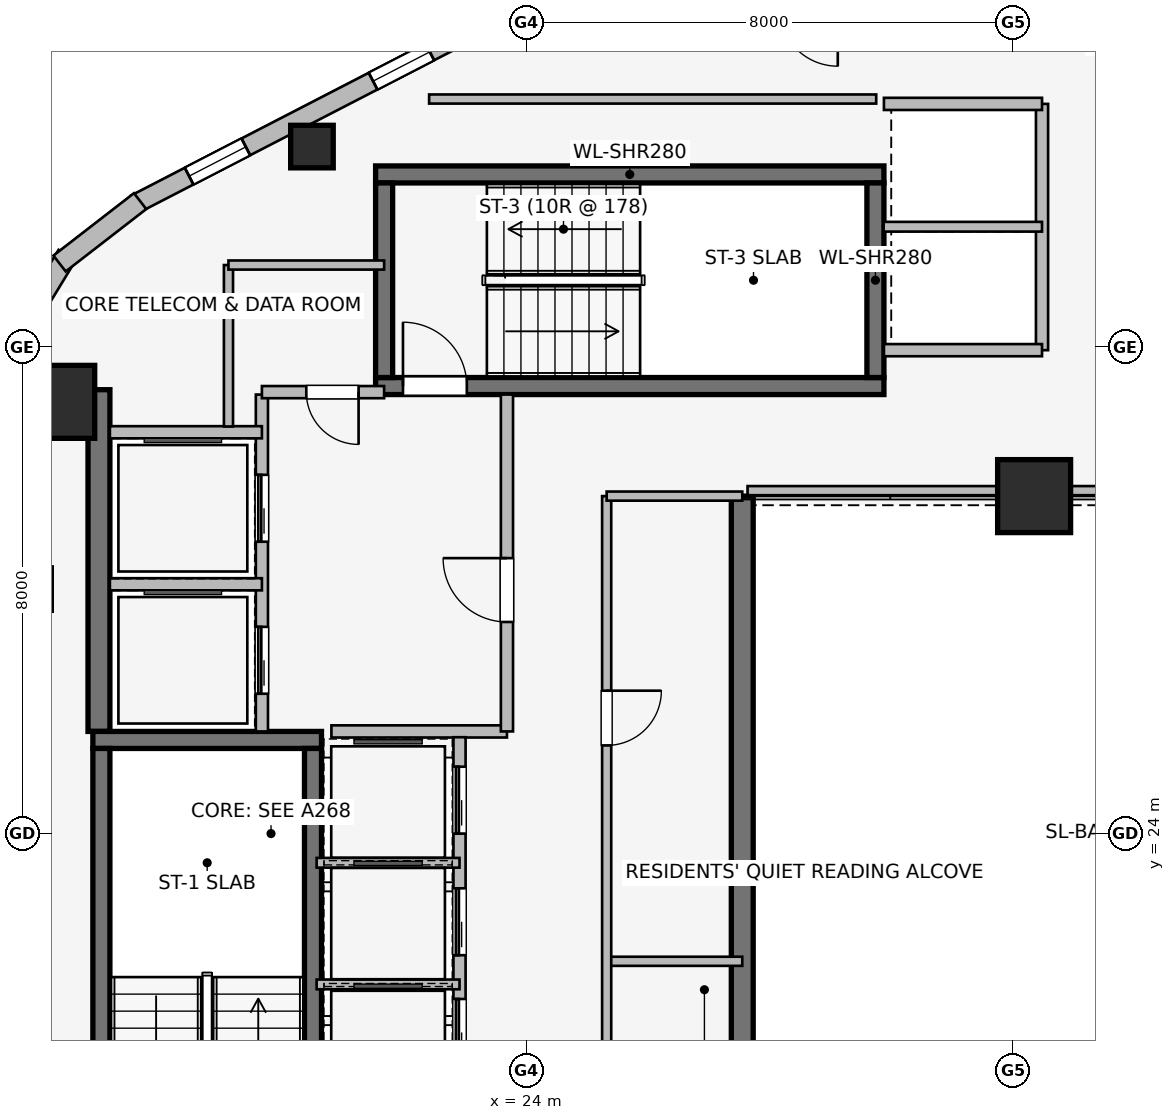
"""IFC4 building model, lengths in metres.
Left out: names, types, materials, properties, quantities, classifications, styles, units other than length and angle.
Written with IfcOpenShell. Run it as: python <this file> out.ifc"""

import sys

from ifc_helpers import new_model, si_unit, direction, frame, frame_2d, origin, origin_2d, place, context, subcontext, project, spatial, rectangle, extrude, element, fill, save


model = new_model("IFC4")
c1 = context("Model", 3, precision=1e-05, world=origin(), true_north=direction((0.0, 1.0)))
c2 = subcontext(c1, "Body", "Model", "MODEL_VIEW")
j1 = project(units=[si_unit("LENGTHUNIT", "METRE"), si_unit("PLANEANGLEUNIT", "RADIAN")], contexts=[c1])
p1 = place(None, origin())
s1 = spatial("IfcSite", under=j1, at=p1, CompositionType="ELEMENT")
p2 = place(p1, origin())
s2 = spatial("IfcBuilding", under=s1, at=p2, CompositionType="ELEMENT")
p3 = place(p2, frame((0.0, 0.0, 241.9)))
s3 = spatial("IfcBuildingStorey", under=s2, at=p3, CompositionType="ELEMENT", Elevation=241.9)
p4 = place(p3, frame((16.97, 25.68, 0.0), z_axis=(0.0, 0.0, 1.0), x_axis=(0.0, 1.0, 0.0)))
e1 = element("IfcWall", 1, at=p4, inside=s3, PredefinedType="SHEAR", context=c2, shape_type="SweptSolid", body=[
    extrude(rectangle(XDim=5.62, YDim=0.36, at=frame_2d((2.81, 0.0))), origin(), (0.0, 0.0, 1.0), 3.55),
])
p5 = place(p3, frame((27.55, 29.55, 0.0), z_axis=(0.0, 0.0, 1.0), x_axis=(0.0, -1.0, 0.0)))
e2 = element("IfcWall", 2, at=p5, inside=s3, PredefinedType="SHEAR", context=c2, shape_type="SweptSolid", body=[
    extrude(rectangle(XDim=11.25, YDim=0.36, at=frame_2d((5.625, 0.0))), origin(), (0.0, 0.0, 1.0), 3.55),
])
p6 = place(p3, frame((20.63, 25.54, 0.0), z_axis=(0.0, 0.0, 1.0), x_axis=(-1.0, 0.0, 0.0)))
e3 = element("IfcWall", 3, at=p6, inside=s3, PredefinedType="SHEAR", context=c2, shape_type="SweptSolid", body=[
    extrude(rectangle(XDim=3.76, YDim=0.28, at=frame_2d((1.88, 0.0))), origin(), (0.0, 0.0, 1.0), 3.55),
])
p7 = place(p3, frame((17.01, 25.4, 0.0), z_axis=(0.0, 0.0, 1.0), x_axis=(0.0, -1.0, 0.0)))
e4 = element("IfcWall", 4, at=p7, inside=s3, PredefinedType="SHEAR", context=c2, shape_type="SweptSolid", body=[
    extrude(rectangle(XDim=7.8, YDim=0.28, at=frame_2d((3.9, 0.0))), origin(), (0.0, 0.0, 1.0), 3.55),
])
p8 = place(p3, frame((20.49, 17.6, 0.0), z_axis=(0.0, 0.0, 1.0), x_axis=(0.0, 1.0, 0.0)))
e5 = element("IfcWall", 5, at=p8, inside=s3, PredefinedType="SHEAR", context=c2, shape_type="SweptSolid", body=[
    extrude(rectangle(XDim=7.8, YDim=0.28, at=frame_2d((3.9, 0.0))), origin(), (0.0, 0.0, 1.0), 3.55),
])
p9 = place(p8, frame((0.44, 0.0, 0.0)))
e6 = element("IfcOpeningElement", 6, at=p9, cuts=e5, PredefinedType="OPENING", context=c2, shape_type="SweptSolid", body=[
    extrude(rectangle(XDim=1.05, YDim=2.0, at=frame_2d((0.525, 1.0))), frame((0.0, 0.15, 0.0), z_axis=(0.0, -1.0, 0.0), x_axis=(1.0, 0.0, 0.0)), (0.0, 0.0, 1.0), 0.3),
])
p10 = place(p3, frame((21.52, 31.36, 0.0), z_axis=(0.0, 0.0, 1.0), x_axis=(1.0, 0.0, 0.0)))
e7 = element("IfcWall", 7, at=p10, inside=s3, PredefinedType="SHEAR", context=c2, shape_type="SweptSolid", body=[
    extrude(rectangle(XDim=8.36, YDim=0.28, at=frame_2d((4.18, 0.0))), origin(), (0.0, 0.0, 1.0), 3.55),
])
p11 = place(p10, frame((0.45, 0.0, 0.0)))
e8 = element("IfcOpeningElement", 8, at=p11, cuts=e7, PredefinedType="OPENING", context=c2, shape_type="SweptSolid", body=[
    extrude(rectangle(XDim=1.05, YDim=2.0, at=frame_2d((0.525, 1.0))), frame((0.0, 0.15, 0.0), z_axis=(0.0, -1.0, 0.0), x_axis=(1.0, 0.0, 0.0)), (0.0, 0.0, 1.0), 0.3),
])
p12 = place(p3, frame((29.88, 34.84, 0.0), z_axis=(0.0, 0.0, 1.0), x_axis=(-1.0, 0.0, 0.0)))
e9 = element("IfcWall", 9, at=p12, inside=s3, PredefinedType="SHEAR", context=c2, shape_type="SweptSolid", body=[
    extrude(rectangle(XDim=8.36, YDim=0.28, at=frame_2d((4.18, 0.0))), origin(), (0.0, 0.0, 1.0), 3.55),
])
for number, where, z_axis, x_axis in (
    (10, (21.66, 34.7, 0.0), (0.0, 0.0, 1.0), (0.0, -1.0, 0.0)),
    (11, (29.74, 31.5, 0.0), (0.0, 0.0, 1.0), (0.0, 1.0, 0.0)),
):
    element("IfcWall", number, at=place(p3, frame(where, z_axis=z_axis, x_axis=x_axis)), inside=s3, PredefinedType="SHEAR", context=c2, shape_type="SweptSolid", body=[
        extrude(rectangle(XDim=3.2, YDim=0.28, at=frame_2d((1.6, 0.0))), origin(), (0.0, 0.0, 1.0), 3.55),
    ])
for number, where, z_axis, x_axis in (
    (12, (16.3, 31.1, 0.0), (0.0, 0.0, 1.0), (1.0, 0.0, 0.0)),
    (13, (32.35, 29.55, 0.0), (0.0, 0.0, 1.0), (1.0, 0.0, 0.0)),
):
    element("IfcColumn", number, at=place(p3, frame(where, z_axis=z_axis, x_axis=x_axis)), inside=s3, PredefinedType="COLUMN", context=c2, shape_type="SweptSolid", body=[
        extrude(rectangle(XDim=1.2, YDim=1.2, at=origin_2d()), origin(), (0.0, 0.0, 1.0), 3.55),
    ])
p13 = place(p3, frame((20.473, 35.298, 0.0), z_axis=(0.0, 0.0, 1.0), x_axis=(1.0, 0.0, 0.0)))
e14 = element("IfcColumn", 14, at=p13, inside=s3, PredefinedType="COLUMN", context=c2, shape_type="SweptSolid", body=[
    extrude(rectangle(XDim=0.7, YDim=0.7, at=origin_2d()), origin(), (0.0, 0.0, 1.0), 3.55),
])
p14 = place(p3, frame((17.566, 34.354, 0.0), z_axis=(0.0, 0.0, 1.0), x_axis=(0.888581481622, 0.458718814218, 0.0)))
e15 = element("IfcWall", 15, at=p14, inside=s3, PredefinedType="STANDARD", context=c2, shape_type="SweptSolid", body=[
    extrude(rectangle(XDim=15.077, YDim=0.31, at=frame_2d((7.539, 0.0))), origin(), (0.0, 0.0, 1.0), 3.29),
])
p15 = place(p14, frame((0.998, 0.0, 0.75)))
e16 = element("IfcOpeningElement", 16, at=p15, cuts=e15, PredefinedType="OPENING", context=c2, shape_type="SweptSolid", body=[
    extrude(rectangle(XDim=1.05, YDim=1.4, at=frame_2d((0.525, 0.7))), frame((0.0, 0.165, 0.0), z_axis=(0.0, -1.0, 0.0), x_axis=(1.0, 0.0, 0.0)), (0.0, 0.0, 1.0), 0.33),
])
p16 = place(p14, frame((4.403, 0.0, 0.75)))
e17 = element("IfcOpeningElement", 17, at=p16, cuts=e15, PredefinedType="OPENING", context=c2, shape_type="SweptSolid", body=[
    extrude(rectangle(XDim=1.05, YDim=1.4, at=frame_2d((0.525, 0.7))), frame((0.0, 0.165, 0.0), z_axis=(0.0, -1.0, 0.0), x_axis=(1.0, 0.0, 0.0)), (0.0, 0.0, 1.0), 0.33),
])
p17 = place(p14, frame((8.086, 0.0, 0.75)))
e18 = element("IfcOpeningElement", 18, at=p17, cuts=e15, PredefinedType="OPENING", context=c2, shape_type="SweptSolid", body=[
    extrude(rectangle(XDim=2.4, YDim=1.6, at=frame_2d((1.2, 0.8))), frame((0.0, 0.165, 0.0), z_axis=(0.0, -1.0, 0.0), x_axis=(1.0, 0.0, 0.0)), (0.0, 0.0, 1.0), 0.33),
])
p18 = place(p14, frame((13.029, 0.0, 0.75)))
e19 = element("IfcOpeningElement", 19, at=p18, cuts=e15, PredefinedType="OPENING", context=c2, shape_type="SweptSolid", body=[
    extrude(rectangle(XDim=1.05, YDim=1.4, at=frame_2d((0.525, 0.7))), frame((0.0, 0.165, 0.0), z_axis=(0.0, -1.0, 0.0), x_axis=(1.0, 0.0, 0.0)), (0.0, 0.0, 1.0), 0.33),
])
p19 = place(p3, frame((15.574, 32.082, 0.0), z_axis=(0.0, 0.0, 1.0), x_axis=(0.520325409202, 0.853968072318, 0.0)))
e20 = element("IfcWall", 20, at=p19, inside=s3, PredefinedType="STANDARD", context=c2, shape_type="SweptSolid", body=[
    extrude(rectangle(XDim=1.678, YDim=0.33, at=frame_2d((0.839, 0.0))), origin(), (0.0, 0.0, 1.0), 3.29),
])
p20 = place(p3, frame((16.322, 33.375, 0.0), z_axis=(0.0, 0.0, 1.0), x_axis=(0.790691856293, 0.61221433207, 0.0)))
e21 = element("IfcWall", 21, at=p20, inside=s3, PredefinedType="STANDARD", context=c2, shape_type="SweptSolid", body=[
    extrude(rectangle(XDim=1.676, YDim=0.33, at=frame_2d((0.838, 0.0))), origin(), (0.0, 0.0, 1.0), 3.29),
])
p21 = place(p3, frame((19.65, 25.68, 0.0), z_axis=(0.0, 0.0, 1.0), x_axis=(0.0, 1.0, 0.0)))
e22 = element("IfcWall", 22, at=p21, inside=s3, PredefinedType="PARTITIONING", context=c2, shape_type="SweptSolid", body=[
    extrude(rectangle(XDim=5.54, YDim=0.2, at=frame_2d((2.77, 0.0))), origin(), (0.0, 0.0, 1.0), 3.29),
])
p22 = place(p21, frame((0.62, 0.0, 0.0)))
e23 = element("IfcOpeningElement", 23, at=p22, cuts=e22, PredefinedType="OPENING", context=c2, shape_type="SweptSolid", body=[
    extrude(rectangle(XDim=1.1, YDim=2.2, at=frame_2d((0.55, 1.1))), frame((0.0, 0.11, 0.0), z_axis=(0.0, -1.0, 0.0), x_axis=(1.0, 0.0, 0.0)), (0.0, 0.0, 1.0), 0.22),
])
p23 = place(p21, frame((3.12, 0.0, 0.0)))
e24 = element("IfcOpeningElement", 24, at=p23, cuts=e22, PredefinedType="OPENING", context=c2, shape_type="SweptSolid", body=[
    extrude(rectangle(XDim=1.1, YDim=2.2, at=frame_2d((0.55, 1.1))), frame((0.0, 0.11, 0.0), z_axis=(0.0, -1.0, 0.0), x_axis=(1.0, 0.0, 0.0)), (0.0, 0.0, 1.0), 0.22),
])
p24 = place(p3, frame((20.793, 25.68, 0.0), z_axis=(0.0, 0.0, 1.0), x_axis=(1.0, 0.0, 0.0)))
e25 = element("IfcWall", 25, at=p24, inside=s3, PredefinedType="PARTITIONING", context=c2, shape_type="SweptSolid", body=[
    extrude(rectangle(XDim=2.887, YDim=0.2, at=frame_2d((1.443, 0.0))), origin(), (0.0, 0.0, 1.0), 3.29),
])
p25 = place(p3, frame((23.68, 25.68, 0.0), z_axis=(0.0, 0.0, 1.0), x_axis=(0.0, 1.0, 0.0)))
e26 = element("IfcWall", 26, at=p25, inside=s3, PredefinedType="PARTITIONING", context=c2, shape_type="SweptSolid", body=[
    extrude(rectangle(XDim=5.54, YDim=0.2, at=frame_2d((2.77, 0.0))), origin(), (0.0, 0.0, 1.0), 3.29),
])
p26 = place(p25, frame((1.8, 0.0, 0.0)))
e27 = element("IfcOpeningElement", 27, at=p26, cuts=e26, PredefinedType="OPENING", context=c2, shape_type="SweptSolid", body=[
    extrude(rectangle(XDim=1.05, YDim=2.0, at=frame_2d((0.525, 1.0))), frame((0.0, 0.11, 0.0), z_axis=(0.0, -1.0, 0.0), x_axis=(1.0, 0.0, 0.0)), (0.0, 0.0, 1.0), 0.22),
])
p27 = place(p3, frame((21.66, 31.26, 0.0), z_axis=(0.0, 0.0, 1.0), x_axis=(-1.0, 0.0, 0.0)))
e28 = element("IfcWall", 28, at=p27, inside=s3, PredefinedType="PARTITIONING", context=c2, shape_type="SweptSolid", body=[
    extrude(rectangle(XDim=2.01, YDim=0.2, at=frame_2d((1.005, 0.0))), origin(), (0.0, 0.0, 1.0), 3.29),
])
p28 = place(p27, frame((0.42, 0.0, 0.0)))
e29 = element("IfcOpeningElement", 29, at=p28, cuts=e28, PredefinedType="OPENING", context=c2, shape_type="SweptSolid", body=[
    extrude(rectangle(XDim=0.86, YDim=2.0, at=frame_2d((0.43, 1.0))), frame((0.0, 0.11, 0.0), z_axis=(0.0, -1.0, 0.0), x_axis=(1.0, 0.0, 0.0)), (0.0, 0.0, 1.0), 0.22),
])
p29 = place(p3, frame((17.15, 28.1, 0.0), z_axis=(0.0, 0.0, 1.0), x_axis=(1.0, 0.0, 0.0)))
e30 = element("IfcWall", 30, at=p29, inside=s3, PredefinedType="PARTITIONING", context=c2, shape_type="SweptSolid", body=[
    extrude(rectangle(XDim=2.5, YDim=0.2, at=frame_2d((1.25, 0.0))), origin(), (0.0, 0.0, 1.0), 3.29),
])
p30 = place(p3, frame((19.65, 30.6, 0.0), z_axis=(0.0, 0.0, 1.0), x_axis=(-1.0, 0.0, 0.0)))
e31 = element("IfcWall", 31, at=p30, inside=s3, PredefinedType="PARTITIONING", context=c2, shape_type="SweptSolid", body=[
    extrude(rectangle(XDim=2.5, YDim=0.2, at=frame_2d((1.25, 0.0))), origin(), (0.0, 0.0, 1.0), 2.19),
])
p31 = place(p3, frame((32.48, 31.95, 0.0), z_axis=(0.0, 0.0, 1.0), x_axis=(0.0, 1.0, 0.0)))
e32 = element("IfcWall", 32, at=p31, inside=s3, PredefinedType="PARTITIONING", context=c2, shape_type="SweptSolid", body=[
    extrude(rectangle(XDim=4.05, YDim=0.2, at=frame_2d((2.025, 0.0))), origin(), (0.0, 0.0, 1.0), 3.29),
])
p32 = place(p3, frame((29.88, 36.0, 0.0), z_axis=(0.0, 0.0, 1.0), x_axis=(1.0, 0.0, 0.0)))
e33 = element("IfcWall", 33, at=p32, inside=s3, PredefinedType="PARTITIONING", context=c2, shape_type="SweptSolid", body=[
    extrude(rectangle(XDim=2.6, YDim=0.2, at=frame_2d((1.3, 0.0))), origin(), (0.0, 0.0, 1.0), 3.29),
])
p33 = place(p3, frame((32.48, 31.95, 0.0), z_axis=(0.0, 0.0, 1.0), x_axis=(-1.0, 0.0, 0.0)))
e34 = element("IfcWall", 34, at=p33, inside=s3, PredefinedType="PARTITIONING", context=c2, shape_type="SweptSolid", body=[
    extrude(rectangle(XDim=2.6, YDim=0.2, at=frame_2d((1.3, 0.0))), origin(), (0.0, 0.0, 1.0), 2.682),
])
p34 = place(p3, frame((29.875, 33.98, 0.0), z_axis=(0.0, 0.0, 1.0), x_axis=(1.0, 0.0, 0.0)))
e35 = element("IfcWall", 35, at=p34, inside=s3, PredefinedType="PARTITIONING", context=c2, shape_type="SweptSolid", body=[
    extrude(rectangle(XDim=2.605, YDim=0.16, at=frame_2d((1.302, 0.0))), origin(), (0.0, 0.0, 1.0), 3.29),
])
p35 = place(p3, frame((22.9, 19.5, 0.0), z_axis=(0.0, 0.0, 1.0), x_axis=(0.0, 1.0, 0.0)))
e36 = element("IfcWall", 36, at=p35, inside=s3, PredefinedType="PARTITIONING", context=c2, shape_type="SweptSolid", body=[
    extrude(rectangle(XDim=6.085, YDim=0.2, at=frame_2d((3.042, 0.0))), origin(), (0.0, 0.0, 1.0), 3.29),
])
p36 = place(p35, frame((0.68, 0.0, 0.0)))
e37 = element("IfcOpeningElement", 37, at=p36, cuts=e36, PredefinedType="OPENING", context=c2, shape_type="SweptSolid", body=[
    extrude(rectangle(XDim=1.1, YDim=2.2, at=frame_2d((0.55, 1.1))), frame((0.0, 0.11, 0.0), z_axis=(0.0, -1.0, 0.0), x_axis=(1.0, 0.0, 0.0)), (0.0, 0.0, 1.0), 0.22),
])
p37 = place(p35, frame((2.5, 0.0, 0.0)))
e38 = element("IfcOpeningElement", 38, at=p37, cuts=e36, PredefinedType="OPENING", context=c2, shape_type="SweptSolid", body=[
    extrude(rectangle(XDim=1.1, YDim=2.2, at=frame_2d((0.55, 1.1))), frame((0.0, 0.11, 0.0), z_axis=(0.0, -1.0, 0.0), x_axis=(1.0, 0.0, 0.0)), (0.0, 0.0, 1.0), 0.22),
])
p38 = place(p35, frame((4.5, 0.0, 0.0)))
e39 = element("IfcOpeningElement", 39, at=p38, cuts=e36, PredefinedType="OPENING", context=c2, shape_type="SweptSolid", body=[
    extrude(rectangle(XDim=1.1, YDim=2.2, at=frame_2d((0.55, 1.1))), frame((0.0, 0.11, 0.0), z_axis=(0.0, -1.0, 0.0), x_axis=(1.0, 0.0, 0.0)), (0.0, 0.0, 1.0), 0.22),
])
for number, where, z_axis, x_axis in (
    (40, (20.55, 21.52, 0.0), (0.0, 0.0, 1.0), (1.0, 0.0, 0.0)),
    (41, (20.55, 23.52, 0.0), (0.0, 0.0, 1.0), (1.0, 0.0, 0.0)),
):
    element("IfcWall", number, at=place(p3, frame(where, z_axis=z_axis, x_axis=x_axis)), inside=s3, PredefinedType="PARTITIONING", context=c2, shape_type="SweptSolid", body=[
        extrude(rectangle(XDim=2.35, YDim=0.16, at=frame_2d((1.175, 0.0))), origin(), (0.0, 0.0, 1.0), 3.29),
    ])
p39 = place(p3, frame((25.32, 21.9, 0.0), z_axis=(0.0, 0.0, 1.0), x_axis=(1.0, 0.0, 0.0)))
e42 = element("IfcWall", 42, at=p39, inside=s3, PredefinedType="PARTITIONING", context=c2, shape_type="SweptSolid", body=[
    extrude(rectangle(XDim=2.23, YDim=0.15, at=frame_2d((1.115, 0.0))), origin(), (0.0, 0.0, 1.0), 3.29),
])
p40 = place(p3, frame((25.32, 29.55, 0.0), z_axis=(0.0, 0.0, 1.0), x_axis=(0.0, -1.0, 0.0)))
e43 = element("IfcWall", 43, at=p40, inside=s3, PredefinedType="PARTITIONING", context=c2, shape_type="SweptSolid", body=[
    extrude(rectangle(XDim=11.19, YDim=0.15, at=frame_2d((5.595, 0.0))), origin(), (0.0, 0.0, 1.0), 3.29),
])
p41 = place(p40, frame((3.2, 0.0, 0.0)))
e44 = element("IfcOpeningElement", 44, at=p41, cuts=e43, PredefinedType="OPENING", context=c2, shape_type="SweptSolid", body=[
    extrude(rectangle(XDim=0.9, YDim=2.0, at=frame_2d((0.45, 1.0))), frame((0.0, 0.085, 0.0), z_axis=(0.0, -1.0, 0.0), x_axis=(1.0, 0.0, 0.0)), (0.0, 0.0, 1.0), 0.17),
])
p42 = place(p40, frame((9.1, 0.0, 0.0)))
e45 = element("IfcOpeningElement", 45, at=p42, cuts=e43, PredefinedType="OPENING", context=c2, shape_type="SweptSolid", body=[
    extrude(rectangle(XDim=0.86, YDim=2.0, at=frame_2d((0.43, 1.0))), frame((0.0, 0.085, 0.0), z_axis=(0.0, -1.0, 0.0), x_axis=(1.0, 0.0, 0.0)), (0.0, 0.0, 1.0), 0.17),
])
p43 = place(p3, frame((27.55, 29.55, 0.0), z_axis=(0.0, 0.0, 1.0), x_axis=(-1.0, 0.0, 0.0)))
e46 = element("IfcWall", 46, at=p43, inside=s3, PredefinedType="PARTITIONING", context=c2, shape_type="SweptSolid", body=[
    extrude(rectangle(XDim=2.23, YDim=0.15, at=frame_2d((1.115, 0.0))), origin(), (0.0, 0.0, 1.0), 2.19),
])
p44 = place(p3, frame((19.1, 33.35, 0.0), z_axis=(0.0, 0.0, 1.0), x_axis=(0.0, -1.0, 0.0)))
e47 = element("IfcWall", 47, at=p44, inside=s3, PredefinedType="PARTITIONING", context=c2, shape_type="SweptSolid", body=[
    extrude(rectangle(XDim=2.655, YDim=0.15, at=frame_2d((1.328, 0.0))), origin(), (0.0, 0.0, 1.0), 3.29),
])
p45 = place(p3, frame((21.66, 33.35, 0.0), z_axis=(0.0, 0.0, 1.0), x_axis=(-1.0, 0.0, 0.0)))
e48 = element("IfcWall", 48, at=p45, inside=s3, PredefinedType="PARTITIONING", context=c2, shape_type="SweptSolid", body=[
    extrude(rectangle(XDim=2.56, YDim=0.15, at=frame_2d((1.28, 0.0))), origin(), (0.0, 0.0, 1.0), 3.29),
])
p46 = place(p3, frame((39.84, 29.64, 0.0), z_axis=(0.0, 0.0, 1.0), x_axis=(-1.0, 0.0, 0.0)))
e49 = element("IfcWall", 49, at=p46, inside=s3, PredefinedType="PARTITIONING", context=c2, shape_type="SweptSolid", body=[
    extrude(rectangle(XDim=12.203, YDim=0.15, at=frame_2d((6.102, 0.0))), origin(), (0.0, 0.0, 1.0), 2.431),
])
p47 = place(p3, frame((29.753, 36.08, 0.0), z_axis=(0.0, 0.0, 1.0), x_axis=(-1.0, 0.0, 0.0)))
e50 = element("IfcWall", 50, at=p47, inside=s3, PredefinedType="PARTITIONING", context=c2, shape_type="SweptSolid", body=[
    extrude(rectangle(XDim=7.353, YDim=0.15, at=frame_2d((3.677, 0.0))), origin(), (0.0, 0.0, 1.0), 3.29),
])
p48 = place(p15, origin())
e51 = element("IfcWindow", 51, at=p48, inside=s3, PartitioningType="SINGLE_PANEL", PredefinedType="WINDOW", context=c2, shape_type="SweptSolid", body=[
    extrude(rectangle(XDim=1.05, YDim=1.4, at=frame_2d((0.525, 0.7))), frame((0.0, 0.03, 0.0), z_axis=(0.0, -1.0, 0.0), x_axis=(1.0, 0.0, 0.0)), (0.0, 0.0, 1.0), 0.06),
])
fill(e16, e51)
p49 = place(p16, origin())
e52 = element("IfcWindow", 52, at=p49, inside=s3, PartitioningType="SINGLE_PANEL", PredefinedType="WINDOW", context=c2, shape_type="SweptSolid", body=[
    extrude(rectangle(XDim=1.05, YDim=1.4, at=frame_2d((0.525, 0.7))), frame((0.0, 0.03, 0.0), z_axis=(0.0, -1.0, 0.0), x_axis=(1.0, 0.0, 0.0)), (0.0, 0.0, 1.0), 0.06),
])
fill(e17, e52)
p50 = place(p11, origin())
e53 = element("IfcDoor", 53, at=p50, inside=s3, OperationType="SINGLE_SWING_LEFT", PredefinedType="DOOR", context=c2, shape_type="SweptSolid", body=[
    extrude(rectangle(XDim=1.05, YDim=2.0, at=frame_2d((0.525, 1.0))), frame((0.0, 0.025, 0.0), z_axis=(0.0, -1.0, 0.0), x_axis=(1.0, 0.0, 0.0)), (0.0, 0.0, 1.0), 0.05),
])
fill(e8, e53)
p51 = place(p22, origin())
e54 = element("IfcDoor", 54, at=p51, inside=s3, OperationType="SLIDING_TO_LEFT", PredefinedType="DOOR", context=c2, shape_type="SweptSolid", body=[
    extrude(rectangle(XDim=1.1, YDim=2.2, at=frame_2d((0.55, 1.1))), frame((0.0, 0.025, 0.0), z_axis=(0.0, -1.0, 0.0), x_axis=(1.0, 0.0, 0.0)), (0.0, 0.0, 1.0), 0.05),
])
fill(e23, e54)
p52 = place(p23, origin())
e55 = element("IfcDoor", 55, at=p52, inside=s3, OperationType="SLIDING_TO_LEFT", PredefinedType="DOOR", context=c2, shape_type="SweptSolid", body=[
    extrude(rectangle(XDim=1.1, YDim=2.2, at=frame_2d((0.55, 1.1))), frame((0.0, 0.025, 0.0), z_axis=(0.0, -1.0, 0.0), x_axis=(1.0, 0.0, 0.0)), (0.0, 0.0, 1.0), 0.05),
])
fill(e24, e55)
p53 = place(p26, origin())
e56 = element("IfcDoor", 56, at=p53, inside=s3, OperationType="SINGLE_SWING_RIGHT", PredefinedType="DOOR", context=c2, shape_type="SweptSolid", body=[
    extrude(rectangle(XDim=1.05, YDim=2.0, at=frame_2d((0.525, 1.0))), frame((0.0, 0.025, 0.0), z_axis=(0.0, -1.0, 0.0), x_axis=(1.0, 0.0, 0.0)), (0.0, 0.0, 1.0), 0.05),
])
fill(e27, e56)
p54 = place(p28, origin())
e57 = element("IfcDoor", 57, at=p54, inside=s3, OperationType="SINGLE_SWING_LEFT", PredefinedType="DOOR", context=c2, shape_type="SweptSolid", body=[
    extrude(rectangle(XDim=0.86, YDim=2.0, at=frame_2d((0.43, 1.0))), frame((0.0, 0.025, 0.0), z_axis=(0.0, -1.0, 0.0), x_axis=(1.0, 0.0, 0.0)), (0.0, 0.0, 1.0), 0.05),
])
fill(e29, e57)
p55 = place(p36, origin())
e58 = element("IfcDoor", 58, at=p55, inside=s3, OperationType="SLIDING_TO_LEFT", PredefinedType="DOOR", context=c2, shape_type="SweptSolid", body=[
    extrude(rectangle(XDim=1.1, YDim=2.2, at=frame_2d((0.55, 1.1))), frame((0.0, 0.025, 0.0), z_axis=(0.0, -1.0, 0.0), x_axis=(1.0, 0.0, 0.0)), (0.0, 0.0, 1.0), 0.05),
])
fill(e37, e58)
p56 = place(p37, origin())
e59 = element("IfcDoor", 59, at=p56, inside=s3, OperationType="SLIDING_TO_LEFT", PredefinedType="DOOR", context=c2, shape_type="SweptSolid", body=[
    extrude(rectangle(XDim=1.1, YDim=2.2, at=frame_2d((0.55, 1.1))), frame((0.0, 0.025, 0.0), z_axis=(0.0, -1.0, 0.0), x_axis=(1.0, 0.0, 0.0)), (0.0, 0.0, 1.0), 0.05),
])
fill(e38, e59)
p57 = place(p38, origin())
e60 = element("IfcDoor", 60, at=p57, inside=s3, OperationType="SLIDING_TO_LEFT", PredefinedType="DOOR", context=c2, shape_type="SweptSolid", body=[
    extrude(rectangle(XDim=1.1, YDim=2.2, at=frame_2d((0.55, 1.1))), frame((0.0, 0.025, 0.0), z_axis=(0.0, -1.0, 0.0), x_axis=(1.0, 0.0, 0.0)), (0.0, 0.0, 1.0), 0.05),
])
fill(e39, e60)
p58 = place(p41, origin())
e61 = element("IfcDoor", 61, at=p58, inside=s3, OperationType="SINGLE_SWING_LEFT", PredefinedType="DOOR", context=c2, shape_type="SweptSolid", body=[
    extrude(rectangle(XDim=0.9, YDim=2.0, at=frame_2d((0.45, 1.0))), frame((0.0, 0.025, 0.0), z_axis=(0.0, -1.0, 0.0), x_axis=(1.0, 0.0, 0.0)), (0.0, 0.0, 1.0), 0.05),
])
fill(e44, e61)
save(model, sys.argv[1])
